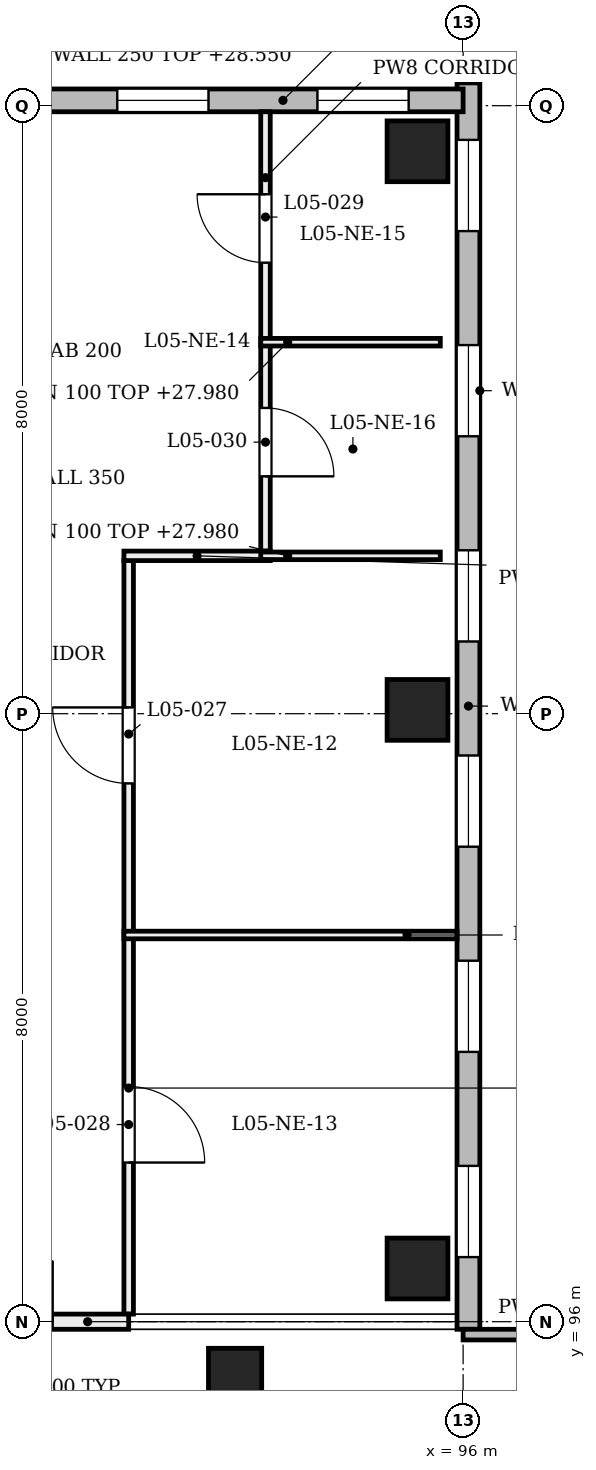
"""IFC4 building model, lengths in metres.
Left out: names, types, materials, properties, quantities, classifications, styles, units other than length and angle.
Written with IfcOpenShell. Run it as: python <this file> out.ifc"""

import sys

from ifc_helpers import new_model, si_unit, direction, frame, frame_2d, origin, origin_2d, place, context, subcontext, project, spatial, rectangle, extrude, element, fill, save


model = new_model("IFC4")
c1 = context("Model", 3, precision=1e-05, world=origin(), true_north=direction((0.0, 1.0)))
c2 = subcontext(c1, "Body", "Model", "MODEL_VIEW")
j1 = project(units=[si_unit("LENGTHUNIT", "METRE"), si_unit("PLANEANGLEUNIT", "RADIAN")], contexts=[c1])
p1 = place(None, origin())
s1 = spatial("IfcSite", under=j1, at=p1, CompositionType="ELEMENT")
p2 = place(p1, origin())
s2 = spatial("IfcBuilding", under=s1, at=p2, CompositionType="ELEMENT")
p3 = place(p2, frame((0.0, 0.0, 24.0)))
s3 = spatial("IfcBuildingStorey", under=s2, at=p3, CompositionType="ELEMENT", Elevation=24.0)
for number, where, z_axis, x_axis in (
    (1, (95.4, 96.7, 0.0), (0.0, 0.0, 1.0), (1.0, 0.0, 0.0)),
    (2, (95.4, 104.05, 0.0), (0.0, 0.0, 1.0), (1.0, 0.0, 0.0)),
    (3, (95.4, 111.4, 0.0), (0.0, 0.0, 1.0), (1.0, 0.0, 0.0)),
):
    element("IfcColumn", number, at=place(p3, frame(where, z_axis=z_axis, x_axis=x_axis)), inside=s3, PredefinedType="COLUMN", context=c2, shape_type="SweptSolid", body=[
        extrude(rectangle(XDim=0.8, YDim=0.8, at=origin_2d()), origin(), (0.0, 0.0, 1.0), 4.58),
    ])
p4 = place(p3, frame((93.0, 95.3, 0.0), z_axis=(0.0, 0.0, 1.0), x_axis=(1.0, 0.0, 0.0)))
e4 = element("IfcColumn", 4, at=p4, inside=s3, PredefinedType="COLUMN", context=c2, shape_type="SweptSolid", body=[
    extrude(rectangle(XDim=0.7, YDim=0.7, at=origin_2d()), origin(), (0.0, 0.0, 1.0), 4.58),
])
p5 = place(p3, frame((96.07, 95.9, 0.0), z_axis=(0.0, 0.0, 1.0), x_axis=(0.0, 1.0, 0.0)))
e5 = element("IfcWall", 5, at=p5, inside=s3, PredefinedType="SOLIDWALL", context=c2, shape_type="SweptSolid", body=[
    extrude(rectangle(XDim=16.4, YDim=0.3, at=frame_2d((8.2, 0.0))), origin(), (0.0, 0.0, 1.0), 3.9),
])
p6 = place(p5, frame((0.95, 0.0, 1.0)))
e6 = element("IfcOpeningElement", 6, at=p6, cuts=e5, PredefinedType="OPENING", context=c2, shape_type="SweptSolid", body=[
    extrude(rectangle(XDim=1.2, YDim=2.4, at=frame_2d((0.6, 1.2))), frame((0.0, 0.16, 0.0), z_axis=(0.0, -1.0, 0.0), x_axis=(1.0, 0.0, 0.0)), (0.0, 0.0, 1.0), 0.32),
])
p7 = place(p5, frame((3.65, 0.0, 1.0)))
e7 = element("IfcOpeningElement", 7, at=p7, cuts=e5, PredefinedType="OPENING", context=c2, shape_type="SweptSolid", body=[
    extrude(rectangle(XDim=1.2, YDim=2.4, at=frame_2d((0.6, 1.2))), frame((0.0, 0.16, 0.0), z_axis=(0.0, -1.0, 0.0), x_axis=(1.0, 0.0, 0.0)), (0.0, 0.0, 1.0), 0.32),
])
p8 = place(p5, frame((6.35, 0.0, 1.0)))
e8 = element("IfcOpeningElement", 8, at=p8, cuts=e5, PredefinedType="OPENING", context=c2, shape_type="SweptSolid", body=[
    extrude(rectangle(XDim=1.2, YDim=2.4, at=frame_2d((0.6, 1.2))), frame((0.0, 0.16, 0.0), z_axis=(0.0, -1.0, 0.0), x_axis=(1.0, 0.0, 0.0)), (0.0, 0.0, 1.0), 0.32),
])
p9 = place(p5, frame((9.05, 0.0, 1.0)))
e9 = element("IfcOpeningElement", 9, at=p9, cuts=e5, PredefinedType="OPENING", context=c2, shape_type="SweptSolid", body=[
    extrude(rectangle(XDim=1.2, YDim=2.4, at=frame_2d((0.6, 1.2))), frame((0.0, 0.16, 0.0), z_axis=(0.0, -1.0, 0.0), x_axis=(1.0, 0.0, 0.0)), (0.0, 0.0, 1.0), 0.32),
])
p10 = place(p5, frame((11.75, 0.0, 1.0)))
e10 = element("IfcOpeningElement", 10, at=p10, cuts=e5, PredefinedType="OPENING", context=c2, shape_type="SweptSolid", body=[
    extrude(rectangle(XDim=1.2, YDim=2.4, at=frame_2d((0.6, 1.2))), frame((0.0, 0.16, 0.0), z_axis=(0.0, -1.0, 0.0), x_axis=(1.0, 0.0, 0.0)), (0.0, 0.0, 1.0), 0.32),
])
p11 = place(p5, frame((14.45, 0.0, 1.0)))
e11 = element("IfcOpeningElement", 11, at=p11, cuts=e5, PredefinedType="OPENING", context=c2, shape_type="SweptSolid", body=[
    extrude(rectangle(XDim=1.2, YDim=2.4, at=frame_2d((0.6, 1.2))), frame((0.0, 0.16, 0.0), z_axis=(0.0, -1.0, 0.0), x_axis=(1.0, 0.0, 0.0)), (0.0, 0.0, 1.0), 0.32),
])
p12 = place(p3, frame((88.1, 112.07, 0.0), z_axis=(0.0, 0.0, 1.0), x_axis=(1.0, 0.0, 0.0)))
e12 = element("IfcWall", 12, at=p12, inside=s3, PredefinedType="SOLIDWALL", context=c2, shape_type="SweptSolid", body=[
    extrude(rectangle(XDim=7.9, YDim=0.3, at=frame_2d((3.95, 0.0))), origin(), (0.0, 0.0, 1.0), 3.9),
])
p13 = place(p12, frame((0.717, 0.0, 1.0)))
e13 = element("IfcOpeningElement", 13, at=p13, cuts=e12, PredefinedType="OPENING", context=c2, shape_type="SweptSolid", body=[
    extrude(rectangle(XDim=1.2, YDim=2.4, at=frame_2d((0.6, 1.2))), frame((0.0, 0.16, 0.0), z_axis=(0.0, -1.0, 0.0), x_axis=(1.0, 0.0, 0.0)), (0.0, 0.0, 1.0), 0.32),
])
p14 = place(p12, frame((3.35, 0.0, 1.0)))
e14 = element("IfcOpeningElement", 14, at=p14, cuts=e12, PredefinedType="OPENING", context=c2, shape_type="SweptSolid", body=[
    extrude(rectangle(XDim=1.2, YDim=2.4, at=frame_2d((0.6, 1.2))), frame((0.0, 0.16, 0.0), z_axis=(0.0, -1.0, 0.0), x_axis=(1.0, 0.0, 0.0)), (0.0, 0.0, 1.0), 0.32),
])
p15 = place(p12, frame((5.983, 0.0, 1.0)))
e15 = element("IfcOpeningElement", 15, at=p15, cuts=e12, PredefinedType="OPENING", context=c2, shape_type="SweptSolid", body=[
    extrude(rectangle(XDim=1.2, YDim=2.4, at=frame_2d((0.6, 1.2))), frame((0.0, 0.16, 0.0), z_axis=(0.0, -1.0, 0.0), x_axis=(1.0, 0.0, 0.0)), (0.0, 0.0, 1.0), 0.32),
])
p16 = place(p3, frame((96.0, 95.83, 0.0), z_axis=(0.0, 0.0, 1.0), x_axis=(1.0, 0.0, 0.0)))
e16 = element("IfcWall", 16, at=p16, inside=s3, PredefinedType="SOLIDWALL", context=c2, shape_type="SweptSolid", body=[
    extrude(rectangle(XDim=5.0, YDim=0.14, at=frame_2d((2.5, 0.0))), origin(), (0.0, 0.0, 1.0), 3.9),
])
p17 = place(p3, frame((91.6, 96.1, 0.0), z_axis=(0.0, 0.0, 1.0), x_axis=(0.0, 1.0, 0.0)))
e17 = element("IfcWall", 17, at=p17, inside=s3, PredefinedType="PARTITIONING", context=c2, shape_type="SweptSolid", body=[
    extrude(rectangle(XDim=9.914, YDim=0.125, at=frame_2d((4.957, 0.0))), origin(), (0.0, 0.0, 1.0), 3.88),
])
p18 = place(p17, frame((6.983, 0.0, 0.0)))
e18 = element("IfcOpeningElement", 18, at=p18, cuts=e17, PredefinedType="OPENING", context=c2, shape_type="SweptSolid", body=[
    extrude(rectangle(XDim=1.0, YDim=2.1, at=frame_2d((0.5, 1.05))), frame((0.0, 0.073, 0.0), z_axis=(0.0, -1.0, 0.0), x_axis=(1.0, 0.0, 0.0)), (0.0, 0.0, 1.0), 0.145),
])
p19 = place(p17, frame((1.994, 0.0, 0.0)))
e19 = element("IfcOpeningElement", 19, at=p19, cuts=e17, PredefinedType="OPENING", context=c2, shape_type="SweptSolid", body=[
    extrude(rectangle(XDim=1.0, YDim=2.1, at=frame_2d((0.5, 1.05))), frame((0.0, 0.073, 0.0), z_axis=(0.0, -1.0, 0.0), x_axis=(1.0, 0.0, 0.0)), (0.0, 0.0, 1.0), 0.145),
])
p20 = place(p3, frame((93.4, 106.139, 0.0), z_axis=(0.0, 0.0, 1.0), x_axis=(0.0, 1.0, 0.0)))
e20 = element("IfcWall", 20, at=p20, inside=s3, PredefinedType="PARTITIONING", context=c2, shape_type="SweptSolid", body=[
    extrude(rectangle(XDim=5.781, YDim=0.125, at=frame_2d((2.89, 0.0))), origin(), (0.0, 0.0, 1.0), 3.88),
])
p21 = place(p20, frame((3.795, 0.0, 0.0)))
e21 = element("IfcOpeningElement", 21, at=p21, cuts=e20, PredefinedType="OPENING", context=c2, shape_type="SweptSolid", body=[
    extrude(rectangle(XDim=0.9, YDim=2.1, at=frame_2d((0.45, 1.05))), frame((0.0, 0.073, 0.0), z_axis=(0.0, -1.0, 0.0), x_axis=(1.0, 0.0, 0.0)), (0.0, 0.0, 1.0), 0.145),
])
p22 = place(p20, frame((0.984, 0.0, 0.0)))
e22 = element("IfcOpeningElement", 22, at=p22, cuts=e20, PredefinedType="OPENING", context=c2, shape_type="SweptSolid", body=[
    extrude(rectangle(XDim=0.9, YDim=2.1, at=frame_2d((0.45, 1.05))), frame((0.0, 0.073, 0.0), z_axis=(0.0, -1.0, 0.0), x_axis=(1.0, 0.0, 0.0)), (0.0, 0.0, 1.0), 0.145),
])
p23 = place(p3, frame((91.538, 101.088, 0.0), z_axis=(0.0, 0.0, 1.0), x_axis=(1.0, 0.0, 0.0)))
e23 = element("IfcWall", 23, at=p23, inside=s3, PredefinedType="PARTITIONING", context=c2, shape_type="SweptSolid", body=[
    extrude(rectangle(XDim=4.382, YDim=0.1, at=frame_2d((2.191, 0.0))), origin(), (0.0, 0.0, 1.0), 3.88),
])
p24 = place(p3, frame((91.538, 106.077, 0.0), z_axis=(0.0, 0.0, 1.0), x_axis=(1.0, 0.0, 0.0)))
e24 = element("IfcWall", 24, at=p24, inside=s3, PredefinedType="PARTITIONING", context=c2, shape_type="SweptSolid", body=[
    extrude(rectangle(XDim=1.925, YDim=0.125, at=frame_2d((0.962, 0.0))), origin(), (0.0, 0.0, 1.0), 4.56),
])
for number, where, z_axis, x_axis in (
    (25, (93.337, 106.077, 0.0), (0.0, 0.0, 1.0), (1.0, 0.0, 0.0)),
    (26, (93.337, 108.888, 0.0), (0.0, 0.0, 1.0), (1.0, 0.0, 0.0)),
):
    element("IfcWall", number, at=place(p3, frame(where, z_axis=z_axis, x_axis=x_axis)), inside=s3, PredefinedType="PARTITIONING", context=c2, shape_type="SweptSolid", body=[
        extrude(rectangle(XDim=2.363, YDim=0.1, at=frame_2d((1.181, 0.0))), origin(), (0.0, 0.0, 1.0), 3.98),
    ])
p25 = place(p3, frame((88.0, 96.0, 0.0), z_axis=(0.0, 0.0, 1.0), x_axis=(1.0, 0.0, 0.0)))
e27 = element("IfcWall", 27, at=p25, inside=s3, PredefinedType="PARTITIONING", context=c2, shape_type="SweptSolid", body=[
    extrude(rectangle(XDim=3.6, YDim=0.2, at=frame_2d((1.8, 0.0))), origin(), (0.0, 0.0, 1.0), 3.88),
])
p26 = place(p25, frame((1.0, 0.0, 0.0)))
e28 = element("IfcOpeningElement", 28, at=p26, cuts=e27, PredefinedType="OPENING", context=c2, shape_type="SweptSolid", body=[
    extrude(rectangle(XDim=1.6, YDim=2.1, at=frame_2d((0.8, 1.05))), frame((0.0, 0.11, 0.0), z_axis=(0.0, -1.0, 0.0), x_axis=(1.0, 0.0, 0.0)), (0.0, 0.0, 1.0), 0.22),
])
p27 = place(p6, origin())
e29 = element("IfcWindow", 29, at=p27, inside=s3, PartitioningType="SINGLE_PANEL", PredefinedType="WINDOW", context=c2, shape_type="SweptSolid", body=[
    extrude(rectangle(XDim=1.2, YDim=2.4, at=frame_2d((0.6, 1.2))), frame((0.0, 0.03, 0.0), z_axis=(0.0, -1.0, 0.0), x_axis=(1.0, 0.0, 0.0)), (0.0, 0.0, 1.0), 0.06),
])
fill(e6, e29)
p28 = place(p7, origin())
e30 = element("IfcWindow", 30, at=p28, inside=s3, PartitioningType="SINGLE_PANEL", PredefinedType="WINDOW", context=c2, shape_type="SweptSolid", body=[
    extrude(rectangle(XDim=1.2, YDim=2.4, at=frame_2d((0.6, 1.2))), frame((0.0, 0.03, 0.0), z_axis=(0.0, -1.0, 0.0), x_axis=(1.0, 0.0, 0.0)), (0.0, 0.0, 1.0), 0.06),
])
fill(e7, e30)
p29 = place(p8, origin())
e31 = element("IfcWindow", 31, at=p29, inside=s3, PartitioningType="SINGLE_PANEL", PredefinedType="WINDOW", context=c2, shape_type="SweptSolid", body=[
    extrude(rectangle(XDim=1.2, YDim=2.4, at=frame_2d((0.6, 1.2))), frame((0.0, 0.03, 0.0), z_axis=(0.0, -1.0, 0.0), x_axis=(1.0, 0.0, 0.0)), (0.0, 0.0, 1.0), 0.06),
])
fill(e8, e31)
p30 = place(p9, origin())
e32 = element("IfcWindow", 32, at=p30, inside=s3, PartitioningType="SINGLE_PANEL", PredefinedType="WINDOW", context=c2, shape_type="SweptSolid", body=[
    extrude(rectangle(XDim=1.2, YDim=2.4, at=frame_2d((0.6, 1.2))), frame((0.0, 0.03, 0.0), z_axis=(0.0, -1.0, 0.0), x_axis=(1.0, 0.0, 0.0)), (0.0, 0.0, 1.0), 0.06),
])
fill(e9, e32)
p31 = place(p10, origin())
e33 = element("IfcWindow", 33, at=p31, inside=s3, PartitioningType="SINGLE_PANEL", PredefinedType="WINDOW", context=c2, shape_type="SweptSolid", body=[
    extrude(rectangle(XDim=1.2, YDim=2.4, at=frame_2d((0.6, 1.2))), frame((0.0, 0.03, 0.0), z_axis=(0.0, -1.0, 0.0), x_axis=(1.0, 0.0, 0.0)), (0.0, 0.0, 1.0), 0.06),
])
fill(e10, e33)
p32 = place(p11, origin())
e34 = element("IfcWindow", 34, at=p32, inside=s3, PartitioningType="SINGLE_PANEL", PredefinedType="WINDOW", context=c2, shape_type="SweptSolid", body=[
    extrude(rectangle(XDim=1.2, YDim=2.4, at=frame_2d((0.6, 1.2))), frame((0.0, 0.03, 0.0), z_axis=(0.0, -1.0, 0.0), x_axis=(1.0, 0.0, 0.0)), (0.0, 0.0, 1.0), 0.06),
])
fill(e11, e34)
p33 = place(p14, origin())
e35 = element("IfcWindow", 35, at=p33, inside=s3, PartitioningType="SINGLE_PANEL", PredefinedType="WINDOW", context=c2, shape_type="SweptSolid", body=[
    extrude(rectangle(XDim=1.2, YDim=2.4, at=frame_2d((0.6, 1.2))), frame((0.0, 0.03, 0.0), z_axis=(0.0, -1.0, 0.0), x_axis=(1.0, 0.0, 0.0)), (0.0, 0.0, 1.0), 0.06),
])
fill(e14, e35)
p34 = place(p15, origin())
e36 = element("IfcWindow", 36, at=p34, inside=s3, PartitioningType="SINGLE_PANEL", PredefinedType="WINDOW", context=c2, shape_type="SweptSolid", body=[
    extrude(rectangle(XDim=1.2, YDim=2.4, at=frame_2d((0.6, 1.2))), frame((0.0, 0.03, 0.0), z_axis=(0.0, -1.0, 0.0), x_axis=(1.0, 0.0, 0.0)), (0.0, 0.0, 1.0), 0.06),
])
fill(e15, e36)
p35 = place(p18, frame((1.0, 0.0, 0.0), z_axis=(0.0, 0.0, 1.0), x_axis=(-1.0, 0.0, 0.0)))
e37 = element("IfcDoor", 37, at=p35, inside=s3, OperationType="SINGLE_SWING_RIGHT", PredefinedType="DOOR", context=c2, shape_type="SweptSolid", body=[
    extrude(rectangle(XDim=1.0, YDim=2.1, at=frame_2d((0.5, 1.05))), frame((0.0, 0.025, 0.0), z_axis=(0.0, -1.0, 0.0), x_axis=(1.0, 0.0, 0.0)), (0.0, 0.0, 1.0), 0.05),
])
fill(e18, e37)
p36 = place(p19, frame((1.0, 0.0, 0.0), z_axis=(0.0, 0.0, 1.0), x_axis=(-1.0, 0.0, 0.0)))
e38 = element("IfcDoor", 38, at=p36, inside=s3, OperationType="SINGLE_SWING_LEFT", PredefinedType="DOOR", context=c2, shape_type="SweptSolid", body=[
    extrude(rectangle(XDim=1.0, YDim=2.1, at=frame_2d((0.5, 1.05))), frame((0.0, 0.025, 0.0), z_axis=(0.0, -1.0, 0.0), x_axis=(1.0, 0.0, 0.0)), (0.0, 0.0, 1.0), 0.05),
])
fill(e19, e38)
p37 = place(p21, frame((0.9, 0.0, 0.0), z_axis=(0.0, 0.0, 1.0), x_axis=(-1.0, 0.0, 0.0)))
e39 = element("IfcDoor", 39, at=p37, inside=s3, OperationType="SINGLE_SWING_RIGHT", PredefinedType="DOOR", context=c2, shape_type="SweptSolid", body=[
    extrude(rectangle(XDim=0.9, YDim=2.1, at=frame_2d((0.45, 1.05))), frame((0.0, 0.025, 0.0), z_axis=(0.0, -1.0, 0.0), x_axis=(1.0, 0.0, 0.0)), (0.0, 0.0, 1.0), 0.05),
])
fill(e21, e39)
p38 = place(p22, frame((0.9, 0.0, 0.0), z_axis=(0.0, 0.0, 1.0), x_axis=(-1.0, 0.0, 0.0)))
e40 = element("IfcDoor", 40, at=p38, inside=s3, OperationType="SINGLE_SWING_LEFT", PredefinedType="DOOR", context=c2, shape_type="SweptSolid", body=[
    extrude(rectangle(XDim=0.9, YDim=2.1, at=frame_2d((0.45, 1.05))), frame((0.0, 0.025, 0.0), z_axis=(0.0, -1.0, 0.0), x_axis=(1.0, 0.0, 0.0)), (0.0, 0.0, 1.0), 0.05),
])
fill(e22, e40)
save(model, sys.argv[1])
